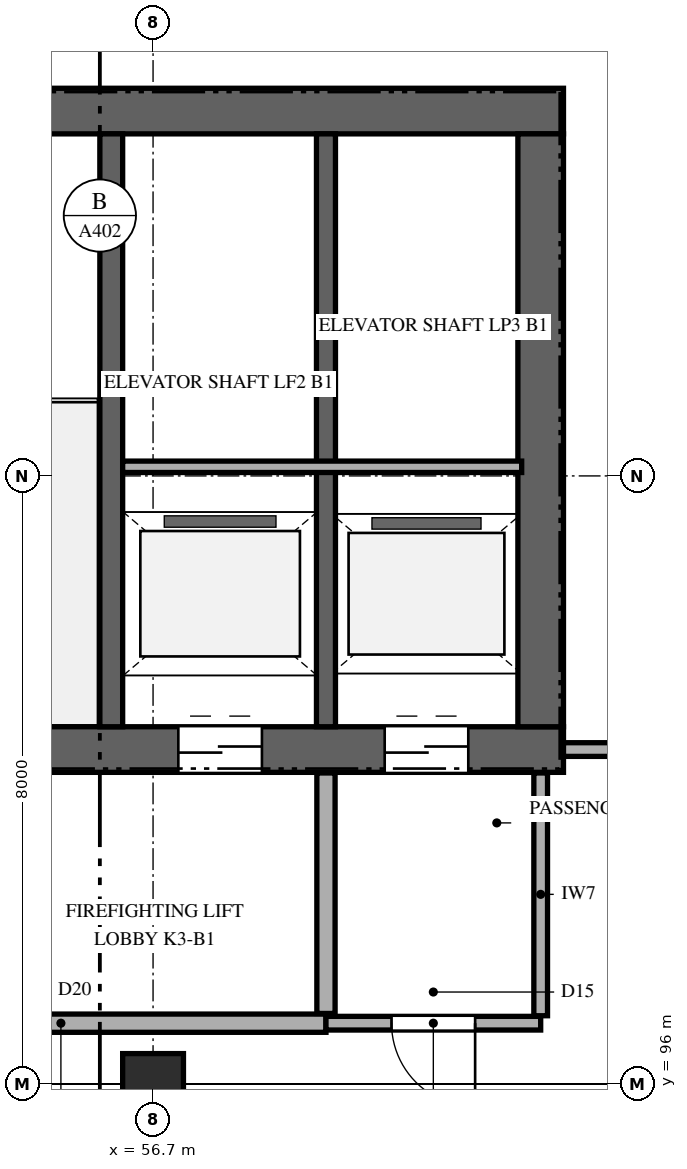
"""IFC4 building model, lengths in metres.
Left out: names, types, materials, properties, quantities, classifications, styles, units other than length and angle.
Written with IfcOpenShell. Run it as: python <this file> out.ifc"""

import sys

from ifc_helpers import new_model, si_unit, direction, frame, frame_2d, origin, origin_2d, place, context, subcontext, project, spatial, rectangle, extrude, element, fill, save


model = new_model("IFC4")
c1 = context("Model", 3, precision=1e-05, world=origin(), true_north=direction((0.0, 1.0)))
c2 = subcontext(c1, "Body", "Model", "MODEL_VIEW")
j1 = project(units=[si_unit("LENGTHUNIT", "METRE"), si_unit("PLANEANGLEUNIT", "RADIAN")], contexts=[c1])
p1 = place(None, origin())
s1 = spatial("IfcSite", under=j1, at=p1, CompositionType="ELEMENT")
p2 = place(p1, origin())
s2 = spatial("IfcBuilding", under=s1, at=p2, CompositionType="ELEMENT")
p3 = place(p2, frame((0.0, 0.0, -4.8)))
s3 = spatial("IfcBuildingStorey", under=s2, at=p3, CompositionType="ELEMENT", Elevation=-4.8)
p4 = place(p3, frame((46.7, 100.4, 0.0), z_axis=(0.0, 0.0, 1.0), x_axis=(1.0, 0.0, 0.0)))
e1 = element("IfcWall", 1, at=p4, inside=s3, PredefinedType="SHEAR", context=c2, shape_type="SweptSolid", body=[
    extrude(rectangle(XDim=15.4, YDim=0.6, at=frame_2d((7.7, 0.0))), origin(), (0.0, 0.0, 1.0), 4.8),
])
p5 = place(p4, frame((1.05, 0.0, 0.0)))
e2 = element("IfcOpeningElement", 2, at=p5, cuts=e1, PredefinedType="OPENING", context=c2, shape_type="SweptSolid", body=[
    extrude(rectangle(XDim=1.15, YDim=2.25, at=frame_2d((0.575, 1.125))), frame((0.0, 0.31, 0.0), z_axis=(0.0, -1.0, 0.0), x_axis=(1.0, 0.0, 0.0)), (0.0, 0.0, 1.0), 0.62),
])
p6 = place(p4, frame((10.333, 0.0, 0.0)))
e3 = element("IfcOpeningElement", 3, at=p6, cuts=e1, PredefinedType="OPENING", context=c2, shape_type="SweptSolid", body=[
    extrude(rectangle(XDim=1.1, YDim=2.2, at=frame_2d((0.55, 1.1))), frame((0.0, 0.31, 0.0), z_axis=(0.0, -1.0, 0.0), x_axis=(1.0, 0.0, 0.0)), (0.0, 0.0, 1.0), 0.62),
])
p7 = place(p4, frame((13.048, 0.0, 0.0)))
e4 = element("IfcOpeningElement", 4, at=p7, cuts=e1, PredefinedType="OPENING", context=c2, shape_type="SweptSolid", body=[
    extrude(rectangle(XDim=1.1, YDim=2.2, at=frame_2d((0.55, 1.1))), frame((0.0, 0.31, 0.0), z_axis=(0.0, -1.0, 0.0), x_axis=(1.0, 0.0, 0.0)), (0.0, 0.0, 1.0), 0.62),
])
p8 = place(p3, frame((46.7, 108.8, 0.0), z_axis=(0.0, 0.0, 1.0), x_axis=(1.0, 0.0, 0.0)))
e5 = element("IfcWall", 5, at=p8, inside=s3, PredefinedType="SHEAR", context=c2, shape_type="SweptSolid", body=[
    extrude(rectangle(XDim=15.4, YDim=0.6, at=frame_2d((7.7, 0.0))), origin(), (0.0, 0.0, 1.0), 4.8),
])
p9 = place(p3, frame((61.8, 100.7, 0.0), z_axis=(0.0, 0.0, 1.0), x_axis=(0.0, 1.0, 0.0)))
e6 = element("IfcWall", 6, at=p9, inside=s3, PredefinedType="SHEAR", context=c2, shape_type="SweptSolid", body=[
    extrude(rectangle(XDim=7.8, YDim=0.6, at=frame_2d((3.9, 0.0))), origin(), (0.0, 0.0, 1.0), 4.8),
])
p10 = place(p3, frame((56.15, 100.7, 0.0), z_axis=(0.0, 0.0, 1.0), x_axis=(0.0, 1.0, 0.0)))
e7 = element("IfcWall", 7, at=p10, inside=s3, PredefinedType="SHEAR", context=c2, shape_type="SweptSolid", body=[
    extrude(rectangle(XDim=7.8, YDim=0.3, at=frame_2d((3.9, 0.0))), origin(), (0.0, 0.0, 1.0), 4.8),
])
p11 = place(p3, frame((58.975, 100.7, 0.0), z_axis=(0.0, 0.0, 1.0), x_axis=(0.0, 1.0, 0.0)))
e8 = element("IfcWall", 8, at=p11, inside=s3, PredefinedType="SHEAR", context=c2, shape_type="SweptSolid", body=[
    extrude(rectangle(XDim=7.8, YDim=0.25, at=frame_2d((3.9, 0.0))), origin(), (0.0, 0.0, 1.0), 4.8),
])
p12 = place(p3, frame((56.7, 96.0, 0.0), z_axis=(0.0, 0.0, 1.0), x_axis=(1.0, 0.0, 0.0)))
e9 = element("IfcColumn", 9, at=p12, inside=s3, PredefinedType="COLUMN", context=c2, shape_type="SweptSolid", body=[
    extrude(rectangle(XDim=0.8, YDim=0.8, at=origin_2d()), origin(), (0.0, 0.0, 1.0), 4.8),
])
p13 = place(p3, frame((56.3, 104.12, 0.0), z_axis=(0.0, 0.0, 1.0), x_axis=(1.0, 0.0, 0.0)))
e10 = element("IfcWall", 10, at=p13, inside=s3, PredefinedType="PARTITIONING", context=c2, shape_type="SweptSolid", body=[
    extrude(rectangle(XDim=5.25, YDim=0.15, at=frame_2d((2.625, 0.0))), origin(), (0.0, 0.0, 1.0), 4.45),
])
p14 = place(p3, frame((52.0, 96.8, 0.0), z_axis=(0.0, 0.0, 1.0), x_axis=(1.0, 0.0, 0.0)))
e11 = element("IfcWall", 11, at=p14, inside=s3, PredefinedType="PARTITIONING", context=c2, shape_type="SweptSolid", body=[
    extrude(rectangle(XDim=6.975, YDim=0.24, at=frame_2d((3.488, 0.0))), origin(), (0.0, 0.0, 1.0), 4.45),
])
p15 = place(p14, frame((1.771, 0.0, 0.0)))
e12 = element("IfcOpeningElement", 12, at=p15, cuts=e11, PredefinedType="OPENING", context=c2, shape_type="SweptSolid", body=[
    extrude(rectangle(XDim=1.2, YDim=2.3, at=frame_2d((0.6, 1.15))), frame((0.0, 0.13, 0.0), z_axis=(0.0, -1.0, 0.0), x_axis=(1.0, 0.0, 0.0)), (0.0, 0.0, 1.0), 0.26),
])
p16 = place(p3, frame((58.975, 96.8, 0.0), z_axis=(0.0, 0.0, 1.0), x_axis=(1.0, 0.0, 0.0)))
e13 = element("IfcWall", 13, at=p16, inside=s3, PredefinedType="PARTITIONING", context=c2, shape_type="SweptSolid", body=[
    extrude(rectangle(XDim=2.825, YDim=0.18, at=frame_2d((1.413, 0.0))), origin(), (0.0, 0.0, 1.0), 4.45),
])
p17 = place(p16, frame((0.863, 0.0, 0.0)))
e14 = element("IfcOpeningElement", 14, at=p17, cuts=e13, PredefinedType="OPENING", context=c2, shape_type="SweptSolid", body=[
    extrude(rectangle(XDim=1.1, YDim=2.2, at=frame_2d((0.55, 1.1))), frame((0.0, 0.1, 0.0), z_axis=(0.0, -1.0, 0.0), x_axis=(1.0, 0.0, 0.0)), (0.0, 0.0, 1.0), 0.2),
])
p18 = place(p3, frame((62.1, 100.4, 0.0), z_axis=(0.0, 0.0, 1.0), x_axis=(1.0, 0.0, 0.0)))
e15 = element("IfcWall", 15, at=p18, inside=s3, PredefinedType="PARTITIONING", context=c2, shape_type="SweptSolid", body=[
    extrude(rectangle(XDim=2.272, YDim=0.18, at=frame_2d((1.136, 0.0))), origin(), (0.0, 0.0, 1.0), 4.45),
])
p19 = place(p3, frame((58.975, 96.928, 0.0), z_axis=(0.0, 0.0, 1.0), x_axis=(0.0, 1.0, 0.0)))
e16 = element("IfcWall", 16, at=p19, inside=s3, PredefinedType="PARTITIONING", context=c2, shape_type="SweptSolid", body=[
    extrude(rectangle(XDim=3.164, YDim=0.24, at=frame_2d((1.582, 0.0))), origin(), (0.0, 0.0, 1.0), 4.45),
])
p20 = place(p3, frame((61.8, 96.898, 0.0), z_axis=(0.0, 0.0, 1.0), x_axis=(0.0, 1.0, 0.0)))
e17 = element("IfcWall", 17, at=p20, inside=s3, PredefinedType="PARTITIONING", context=c2, shape_type="SweptSolid", body=[
    extrude(rectangle(XDim=3.194, YDim=0.18, at=frame_2d((1.597, 0.0))), origin(), (0.0, 0.0, 1.0), 4.45),
])
p21 = place(p6, frame((1.1, 0.0, 0.0), z_axis=(0.0, 0.0, 1.0), x_axis=(-1.0, 0.0, 0.0)))
e18 = element("IfcDoor", 18, at=p21, inside=s3, OperationType="DOUBLE_DOOR_SLIDING", PredefinedType="DOOR", context=c2, shape_type="SweptSolid", body=[
    extrude(rectangle(XDim=1.1, YDim=2.2, at=frame_2d((0.55, 1.1))), frame((0.0, 0.025, 0.0), z_axis=(0.0, -1.0, 0.0), x_axis=(1.0, 0.0, 0.0)), (0.0, 0.0, 1.0), 0.05),
])
fill(e3, e18)
p22 = place(p7, frame((1.1, 0.0, 0.0), z_axis=(0.0, 0.0, 1.0), x_axis=(-1.0, 0.0, 0.0)))
e19 = element("IfcDoor", 19, at=p22, inside=s3, OperationType="DOUBLE_DOOR_SLIDING", PredefinedType="DOOR", context=c2, shape_type="SweptSolid", body=[
    extrude(rectangle(XDim=1.1, YDim=2.2, at=frame_2d((0.55, 1.1))), frame((0.0, 0.025, 0.0), z_axis=(0.0, -1.0, 0.0), x_axis=(1.0, 0.0, 0.0)), (0.0, 0.0, 1.0), 0.05),
])
fill(e4, e19)
p23 = place(p17, frame((1.1, 0.0, 0.0), z_axis=(0.0, 0.0, 1.0), x_axis=(-1.0, 0.0, 0.0)))
e20 = element("IfcDoor", 20, at=p23, inside=s3, OperationType="SINGLE_SWING_RIGHT", PredefinedType="DOOR", context=c2, shape_type="SweptSolid", body=[
    extrude(rectangle(XDim=1.1, YDim=2.2, at=frame_2d((0.55, 1.1))), frame((0.0, 0.025, 0.0), z_axis=(0.0, -1.0, 0.0), x_axis=(1.0, 0.0, 0.0)), (0.0, 0.0, 1.0), 0.05),
])
fill(e14, e20)
save(model, sys.argv[1])
